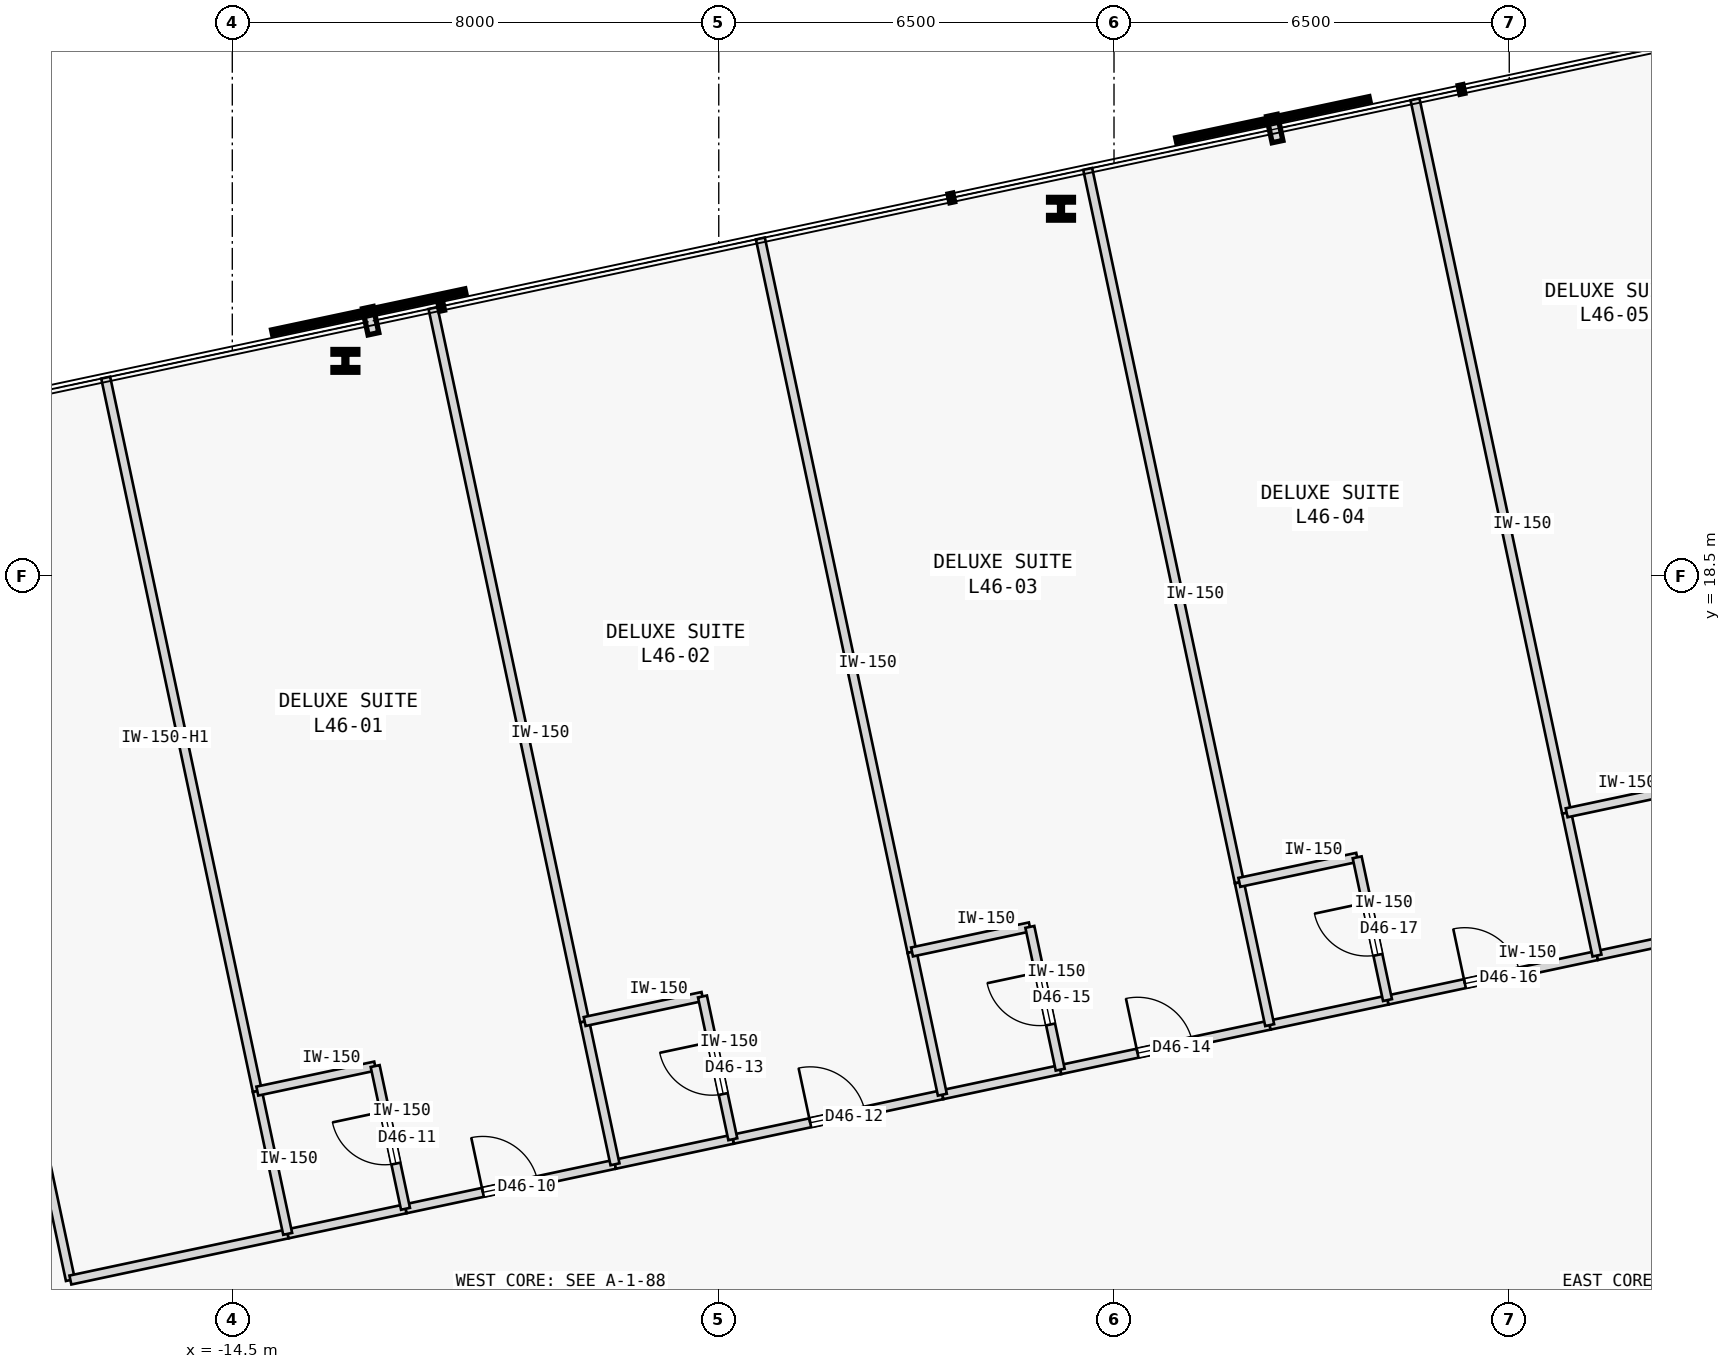
"""IFC4 building model, lengths in metres.
Left out: names, types, materials, properties, quantities, classifications, styles, units other than length and angle.
Written with IfcOpenShell. Run it as: python <this file> out.ifc"""

import sys

from ifc_helpers import new_model, si_unit, direction, frame, frame_2d, origin, origin_2d, place, context, subcontext, project, spatial, rectangle, i_section, extrude, element, fill, save


model = new_model("IFC4")
c1 = context("Model", 3, precision=1e-05, world=origin(), true_north=direction((0.0, 1.0)))
c2 = subcontext(c1, "Body", "Model", "MODEL_VIEW")
j1 = project(units=[si_unit("LENGTHUNIT", "METRE"), si_unit("PLANEANGLEUNIT", "RADIAN")], contexts=[c1])
p1 = place(None, origin())
s1 = spatial("IfcSite", under=j1, at=p1, CompositionType="ELEMENT")
p2 = place(p1, origin())
s2 = spatial("IfcBuilding", under=s1, at=p2, CompositionType="ELEMENT")
p3 = place(p2, frame((0.0, 0.0, 178.6)))
s3 = spatial("IfcBuildingStorey", under=s2, at=p3, CompositionType="ELEMENT", Elevation=178.6)
for number, where, z_axis, x_axis in (
    (1, (-0.872, 24.543, 0.0), (0.0, 0.0, 1.0), (1.0, 0.0, 0.0)),
    (2, (-12.64, 22.042, 0.0), (0.0, 0.0, 1.0), (1.0, 0.0, 0.0)),
):
    element("IfcColumn", number, at=place(p3, frame(where, z_axis=z_axis, x_axis=x_axis)), inside=s3, PredefinedType="COLUMN", context=c2, shape_type="SweptSolid", body=[
        extrude(i_section(OverallWidth=0.409, OverallDepth=0.374, WebThickness=0.048, FlangeThickness=0.077, FilletRadius=0.015, at=origin_2d()), origin(), (0.0, 0.0, 1.0), 3.4),
    ])
p4 = place(p3, frame((-17.162, 6.926, 0.0), z_axis=(0.0, 0.0, 1.0), x_axis=(-0.207911421929, 0.978147657888, 0.0)))
e3 = element("IfcWall", 3, at=p4, inside=s3, PredefinedType="PARTITIONING", context=c2, shape_type="SweptSolid", body=[
    extrude(rectangle(XDim=13.195, YDim=0.15, at=frame_2d((6.598, 0.0))), origin(), (0.0, 0.0, 1.0), 2.725),
])
p5 = place(p4, frame((6.137, 0.0, 0.0)))
e4 = element("IfcOpeningElement", 4, at=p5, cuts=e3, PredefinedType="OPENING", context=c2, shape_type="SweptSolid", body=[
    extrude(rectangle(XDim=0.92, YDim=2.15, at=frame_2d((0.46, 1.075))), frame((0.0, 0.085, 0.0), z_axis=(0.0, -1.0, 0.0), x_axis=(1.0, 0.0, 0.0)), (0.0, 0.0, 1.0), 0.17),
])
p6 = place(p3, frame((-17.162, 6.926, 0.0), z_axis=(0.0, 0.0, 1.0), x_axis=(0.978147299501, 0.207913108004, 0.0)))
e5 = element("IfcWall", 5, at=p6, inside=s3, PredefinedType="PARTITIONING", context=c2, shape_type="SweptSolid", body=[
    extrude(rectangle(XDim=3.653, YDim=0.15, at=frame_2d((1.827, 0.0))), origin(), (0.0, 0.0, 1.0), 3.175),
])
p7 = place(p3, frame((-11.652, 8.097, 0.0), z_axis=(0.0, 0.0, 1.0), x_axis=(0.978153036861, 0.207886114205, 0.0)))
e6 = element("IfcWall", 6, at=p7, inside=s3, PredefinedType="PARTITIONING", context=c2, shape_type="SweptSolid", body=[
    extrude(rectangle(XDim=3.522, YDim=0.15, at=frame_2d((1.761, 0.0))), origin(), (0.0, 0.0, 1.0), 3.175),
])
p8 = place(p7, frame((1.301, 0.0, 0.0)))
e7 = element("IfcOpeningElement", 7, at=p8, cuts=e6, PredefinedType="OPENING", context=c2, shape_type="SweptSolid", body=[
    extrude(rectangle(XDim=0.92, YDim=2.15, at=frame_2d((0.46, 1.075))), frame((0.0, 0.085, 0.0), z_axis=(0.0, -1.0, 0.0), x_axis=(1.0, 0.0, 0.0)), (0.0, 0.0, 1.0), 0.17),
])
p9 = place(p3, frame((-13.589, 7.685, 0.0), z_axis=(0.0, 0.0, 1.0), x_axis=(0.97811873796, 0.208047433175, 0.0)))
e8 = element("IfcWall", 8, at=p9, inside=s3, PredefinedType="PARTITIONING", context=c2, shape_type="SweptSolid", body=[
    extrude(rectangle(XDim=1.981, YDim=0.15, at=frame_2d((0.99, 0.0))), origin(), (0.0, 0.0, 1.0), 3.175),
])
p10 = place(p3, frame((-6.269, 9.241, 0.0), z_axis=(0.0, 0.0, 1.0), x_axis=(0.978150924733, 0.207896052016, 0.0)))
e9 = element("IfcWall", 9, at=p10, inside=s3, PredefinedType="PARTITIONING", context=c2, shape_type="SweptSolid", body=[
    extrude(rectangle(XDim=3.523, YDim=0.15, at=frame_2d((1.761, 0.0))), origin(), (0.0, 0.0, 1.0), 3.175),
])
p11 = place(p10, frame((1.302, 0.0, 0.0)))
e10 = element("IfcOpeningElement", 10, at=p11, cuts=e9, PredefinedType="OPENING", context=c2, shape_type="SweptSolid", body=[
    extrude(rectangle(XDim=0.92, YDim=2.15, at=frame_2d((0.46, 1.075))), frame((0.0, 0.085, 0.0), z_axis=(0.0, -1.0, 0.0), x_axis=(1.0, 0.0, 0.0)), (0.0, 0.0, 1.0), 0.17),
])
p12 = place(p3, frame((-8.207, 8.83, 0.0), z_axis=(0.0, 0.0, 1.0), x_axis=(0.978149140323, 0.20790444749, 0.0)))
e11 = element("IfcWall", 11, at=p12, inside=s3, PredefinedType="PARTITIONING", context=c2, shape_type="SweptSolid", body=[
    extrude(rectangle(XDim=1.981, YDim=0.15, at=frame_2d((0.99, 0.0))), origin(), (0.0, 0.0, 1.0), 3.175),
])
p13 = place(p3, frame((-0.885, 10.386, 0.0), z_axis=(0.0, 0.0, 1.0), x_axis=(0.978153036861, 0.207886114205, 0.0)))
e12 = element("IfcWall", 12, at=p13, inside=s3, PredefinedType="PARTITIONING", context=c2, shape_type="SweptSolid", body=[
    extrude(rectangle(XDim=3.522, YDim=0.15, at=frame_2d((1.761, 0.0))), origin(), (0.0, 0.0, 1.0), 3.175),
])
p14 = place(p13, frame((1.301, 0.0, 0.0)))
e13 = element("IfcOpeningElement", 13, at=p14, cuts=e12, PredefinedType="OPENING", context=c2, shape_type="SweptSolid", body=[
    extrude(rectangle(XDim=0.92, YDim=2.15, at=frame_2d((0.46, 1.075))), frame((0.0, 0.085, 0.0), z_axis=(0.0, -1.0, 0.0), x_axis=(1.0, 0.0, 0.0)), (0.0, 0.0, 1.0), 0.17),
])
p15 = place(p3, frame((-2.823, 9.974, 0.0), z_axis=(0.0, 0.0, 1.0), x_axis=(0.978149140323, 0.20790444749, 0.0)))
e14 = element("IfcWall", 14, at=p15, inside=s3, PredefinedType="PARTITIONING", context=c2, shape_type="SweptSolid", body=[
    extrude(rectangle(XDim=1.981, YDim=0.15, at=frame_2d((0.99, 0.0))), origin(), (0.0, 0.0, 1.0), 3.175),
])
p16 = place(p3, frame((4.498, 11.53, 0.0), z_axis=(0.0, 0.0, 1.0), x_axis=(0.978135941404, 0.207966536089, 0.0)))
e15 = element("IfcWall", 15, at=p16, inside=s3, PredefinedType="PARTITIONING", context=c2, shape_type="SweptSolid", body=[
    extrude(rectangle(XDim=3.522, YDim=0.15, at=frame_2d((1.761, 0.0))), origin(), (0.0, 0.0, 1.0), 3.175),
])
p17 = place(p16, frame((1.301, 0.0, 0.0)))
e16 = element("IfcOpeningElement", 16, at=p17, cuts=e15, PredefinedType="OPENING", context=c2, shape_type="SweptSolid", body=[
    extrude(rectangle(XDim=0.92, YDim=2.15, at=frame_2d((0.46, 1.075))), frame((0.0, 0.085, 0.0), z_axis=(0.0, -1.0, 0.0), x_axis=(1.0, 0.0, 0.0)), (0.0, 0.0, 1.0), 0.17),
])
p18 = place(p3, frame((2.56, 11.118, 0.0), z_axis=(0.0, 0.0, 1.0), x_axis=(0.978149140323, 0.20790444749, 0.0)))
e17 = element("IfcWall", 17, at=p18, inside=s3, PredefinedType="PARTITIONING", context=c2, shape_type="SweptSolid", body=[
    extrude(rectangle(XDim=1.981, YDim=0.15, at=frame_2d((0.99, 0.0))), origin(), (0.0, 0.0, 1.0), 3.175),
])
p19 = place(p3, frame((7.943, 12.262, 0.0), z_axis=(0.0, 0.0, 1.0), x_axis=(0.978146728319, 0.207915795165, 0.0)))
e18 = element("IfcWall", 18, at=p19, inside=s3, PredefinedType="PARTITIONING", context=c2, shape_type="SweptSolid", body=[
    extrude(rectangle(XDim=2.15, YDim=0.15, at=frame_2d((1.075, 0.0))), origin(), (0.0, 0.0, 1.0), 3.175),
])
p20 = place(p3, frame((-14.088, 10.033, 0.0), z_axis=(0.0, 0.0, 1.0), x_axis=(-0.207910848762, 0.978147779718, 0.0)))
e19 = element("IfcWall", 19, at=p20, inside=s3, PredefinedType="PARTITIONING", context=c2, shape_type="SweptSolid", body=[
    extrude(rectangle(XDim=11.995, YDim=0.15, at=frame_2d((5.998, 0.0))), origin(), (0.0, 0.0, 1.0), 2.725),
])
p21 = place(p3, frame((-13.589, 7.685, 0.0), z_axis=(0.0, 0.0, 1.0), x_axis=(-0.207917150959, 0.978146440129, 0.0)))
e20 = element("IfcWall", 20, at=p21, inside=s3, PredefinedType="PARTITIONING", context=c2, shape_type="SweptSolid", body=[
    extrude(rectangle(XDim=2.4, YDim=0.15, at=frame_2d((1.2, 0.0))), origin(), (0.0, 0.0, 1.0), 3.175),
])
p22 = place(p3, frame((-14.088, 10.033, 0.0), z_axis=(0.0, 0.0, 1.0), x_axis=(0.978149140323, 0.20790444749, 0.0)))
e21 = element("IfcWall", 21, at=p22, inside=s3, PredefinedType="PARTITIONING", context=c2, shape_type="SweptSolid", body=[
    extrude(rectangle(XDim=1.981, YDim=0.15, at=frame_2d((0.99, 0.0))), origin(), (0.0, 0.0, 1.0), 3.175),
])
p23 = place(p3, frame((-11.652, 8.097, 0.0), z_axis=(0.0, 0.0, 1.0), x_axis=(-0.207840504985, 0.978162729042, 0.0)))
e22 = element("IfcWall", 22, at=p23, inside=s3, PredefinedType="PARTITIONING", context=c2, shape_type="SweptSolid", body=[
    extrude(rectangle(XDim=2.4, YDim=0.15, at=frame_2d((1.2, 0.0))), origin(), (0.0, 0.0, 1.0), 3.175),
])
p24 = place(p23, frame((0.76, 0.0, 0.0)))
e23 = element("IfcOpeningElement", 23, at=p24, cuts=e22, PredefinedType="OPENING", context=c2, shape_type="SweptSolid", body=[
    extrude(rectangle(XDim=0.88, YDim=2.15, at=frame_2d((0.44, 1.075))), frame((0.0, 0.085, 0.0), z_axis=(0.0, -1.0, 0.0), x_axis=(1.0, 0.0, 0.0)), (0.0, 0.0, 1.0), 0.17),
])
p25 = place(p3, frame((-8.706, 11.177, 0.0), z_axis=(0.0, 0.0, 1.0), x_axis=(-0.207910848762, 0.978147779718, 0.0)))
e24 = element("IfcWall", 24, at=p25, inside=s3, PredefinedType="PARTITIONING", context=c2, shape_type="SweptSolid", body=[
    extrude(rectangle(XDim=11.995, YDim=0.15, at=frame_2d((5.998, 0.0))), origin(), (0.0, 0.0, 1.0), 3.175),
])
p26 = place(p3, frame((-8.207, 8.83, 0.0), z_axis=(0.0, 0.0, 1.0), x_axis=(-0.207937840262, 0.978142042133, 0.0)))
e25 = element("IfcWall", 25, at=p26, inside=s3, PredefinedType="PARTITIONING", context=c2, shape_type="SweptSolid", body=[
    extrude(rectangle(XDim=2.4, YDim=0.15, at=frame_2d((1.2, 0.0))), origin(), (0.0, 0.0, 1.0), 3.175),
])
p27 = place(p3, frame((-8.706, 11.177, 0.0), z_axis=(0.0, 0.0, 1.0), x_axis=(0.978149140323, 0.20790444749, 0.0)))
e26 = element("IfcWall", 26, at=p27, inside=s3, PredefinedType="PARTITIONING", context=c2, shape_type="SweptSolid", body=[
    extrude(rectangle(XDim=1.981, YDim=0.15, at=frame_2d((0.99, 0.0))), origin(), (0.0, 0.0, 1.0), 3.175),
])
p28 = place(p3, frame((-6.269, 9.241, 0.0), z_axis=(0.0, 0.0, 1.0), x_axis=(-0.207937840262, 0.978142042133, 0.0)))
e27 = element("IfcWall", 27, at=p28, inside=s3, PredefinedType="PARTITIONING", context=c2, shape_type="SweptSolid", body=[
    extrude(rectangle(XDim=2.4, YDim=0.15, at=frame_2d((1.2, 0.0))), origin(), (0.0, 0.0, 1.0), 3.175),
])
p29 = place(p28, frame((0.76, 0.0, 0.0)))
e28 = element("IfcOpeningElement", 28, at=p29, cuts=e27, PredefinedType="OPENING", context=c2, shape_type="SweptSolid", body=[
    extrude(rectangle(XDim=0.88, YDim=2.15, at=frame_2d((0.44, 1.075))), frame((0.0, 0.085, 0.0), z_axis=(0.0, -1.0, 0.0), x_axis=(1.0, 0.0, 0.0)), (0.0, 0.0, 1.0), 0.17),
])
p30 = place(p3, frame((-3.322, 12.321, 0.0), z_axis=(0.0, 0.0, 1.0), x_axis=(-0.207910848762, 0.978147779718, 0.0)))
e29 = element("IfcWall", 29, at=p30, inside=s3, PredefinedType="PARTITIONING", context=c2, shape_type="SweptSolid", body=[
    extrude(rectangle(XDim=11.995, YDim=0.15, at=frame_2d((5.998, 0.0))), origin(), (0.0, 0.0, 1.0), 3.175),
])
p31 = place(p3, frame((-2.823, 9.974, 0.0), z_axis=(0.0, 0.0, 1.0), x_axis=(-0.207937840262, 0.978142042133, 0.0)))
e30 = element("IfcWall", 30, at=p31, inside=s3, PredefinedType="PARTITIONING", context=c2, shape_type="SweptSolid", body=[
    extrude(rectangle(XDim=2.4, YDim=0.15, at=frame_2d((1.2, 0.0))), origin(), (0.0, 0.0, 1.0), 3.175),
])
p32 = place(p3, frame((-3.322, 12.321, 0.0), z_axis=(0.0, 0.0, 1.0), x_axis=(0.978124071753, 0.208022355187, 0.0)))
e31 = element("IfcWall", 31, at=p32, inside=s3, PredefinedType="PARTITIONING", context=c2, shape_type="SweptSolid", body=[
    extrude(rectangle(XDim=1.981, YDim=0.15, at=frame_2d((0.991, 0.0))), origin(), (0.0, 0.0, 1.0), 3.175),
])
p33 = place(p3, frame((-0.885, 10.386, 0.0), z_axis=(0.0, 0.0, 1.0), x_axis=(-0.207917150959, 0.978146440129, 0.0)))
e32 = element("IfcWall", 32, at=p33, inside=s3, PredefinedType="PARTITIONING", context=c2, shape_type="SweptSolid", body=[
    extrude(rectangle(XDim=2.4, YDim=0.15, at=frame_2d((1.2, 0.0))), origin(), (0.0, 0.0, 1.0), 3.175),
])
p34 = place(p33, frame((0.76, 0.0, 0.0)))
e33 = element("IfcOpeningElement", 33, at=p34, cuts=e32, PredefinedType="OPENING", context=c2, shape_type="SweptSolid", body=[
    extrude(rectangle(XDim=0.88, YDim=2.15, at=frame_2d((0.44, 1.075))), frame((0.0, 0.085, 0.0), z_axis=(0.0, -1.0, 0.0), x_axis=(1.0, 0.0, 0.0)), (0.0, 0.0, 1.0), 0.17),
])
p35 = place(p3, frame((2.061, 13.466, 0.0), z_axis=(0.0, 0.0, 1.0), x_axis=(-0.207910848762, 0.978147779718, 0.0)))
e34 = element("IfcWall", 34, at=p35, inside=s3, PredefinedType="PARTITIONING", context=c2, shape_type="SweptSolid", body=[
    extrude(rectangle(XDim=11.995, YDim=0.15, at=frame_2d((5.998, 0.0))), origin(), (0.0, 0.0, 1.0), 3.175),
])
p36 = place(p3, frame((2.56, 11.118, 0.0), z_axis=(0.0, 0.0, 1.0), x_axis=(-0.207917150959, 0.978146440129, 0.0)))
e35 = element("IfcWall", 35, at=p36, inside=s3, PredefinedType="PARTITIONING", context=c2, shape_type="SweptSolid", body=[
    extrude(rectangle(XDim=2.4, YDim=0.15, at=frame_2d((1.2, 0.0))), origin(), (0.0, 0.0, 1.0), 3.175),
])
p37 = place(p3, frame((2.061, 13.466, 0.0), z_axis=(0.0, 0.0, 1.0), x_axis=(0.978149140323, 0.20790444749, 0.0)))
e36 = element("IfcWall", 36, at=p37, inside=s3, PredefinedType="PARTITIONING", context=c2, shape_type="SweptSolid", body=[
    extrude(rectangle(XDim=1.981, YDim=0.15, at=frame_2d((0.99, 0.0))), origin(), (0.0, 0.0, 1.0), 3.175),
])
p38 = place(p3, frame((4.498, 11.53, 0.0), z_axis=(0.0, 0.0, 1.0), x_axis=(-0.207917150959, 0.978146440129, 0.0)))
e37 = element("IfcWall", 37, at=p38, inside=s3, PredefinedType="PARTITIONING", context=c2, shape_type="SweptSolid", body=[
    extrude(rectangle(XDim=2.4, YDim=0.15, at=frame_2d((1.2, 0.0))), origin(), (0.0, 0.0, 1.0), 3.175),
])
p39 = place(p38, frame((0.76, 0.0, 0.0)))
e38 = element("IfcOpeningElement", 38, at=p39, cuts=e37, PredefinedType="OPENING", context=c2, shape_type="SweptSolid", body=[
    extrude(rectangle(XDim=0.88, YDim=2.15, at=frame_2d((0.44, 1.075))), frame((0.0, 0.085, 0.0), z_axis=(0.0, -1.0, 0.0), x_axis=(1.0, 0.0, 0.0)), (0.0, 0.0, 1.0), 0.17),
])
p40 = place(p3, frame((7.444, 14.61, 0.0), z_axis=(0.0, 0.0, 1.0), x_axis=(-0.207910848762, 0.978147779718, 0.0)))
e39 = element("IfcWall", 39, at=p40, inside=s3, PredefinedType="PARTITIONING", context=c2, shape_type="SweptSolid", body=[
    extrude(rectangle(XDim=11.995, YDim=0.15, at=frame_2d((5.998, 0.0))), origin(), (0.0, 0.0, 1.0), 3.175),
])
p41 = place(p3, frame((7.943, 12.262, 0.0), z_axis=(0.0, 0.0, 1.0), x_axis=(-0.207937840262, 0.978142042133, 0.0)))
e40 = element("IfcWall", 40, at=p41, inside=s3, PredefinedType="PARTITIONING", context=c2, shape_type="SweptSolid", body=[
    extrude(rectangle(XDim=2.4, YDim=0.15, at=frame_2d((1.2, 0.0))), origin(), (0.0, 0.0, 1.0), 3.175),
])
p42 = place(p3, frame((7.444, 14.61, 0.0), z_axis=(0.0, 0.0, 1.0), x_axis=(0.978151636287, 0.207892704126, 0.0)))
e41 = element("IfcWall", 41, at=p42, inside=s3, PredefinedType="PARTITIONING", context=c2, shape_type="SweptSolid", body=[
    extrude(rectangle(XDim=2.15, YDim=0.15, at=frame_2d((1.075, 0.0))), origin(), (0.0, 0.0, 1.0), 3.175),
])
p43 = place(p8, origin())
e42 = element("IfcDoor", 42, at=p43, inside=s3, OperationType="SINGLE_SWING_LEFT", PredefinedType="DOOR", context=c2, shape_type="SweptSolid", body=[
    extrude(rectangle(XDim=0.92, YDim=2.15, at=frame_2d((0.46, 1.075))), frame((0.0, 0.025, 0.0), z_axis=(0.0, -1.0, 0.0), x_axis=(1.0, 0.0, 0.0)), (0.0, 0.0, 1.0), 0.05),
])
fill(e7, e42)
p44 = place(p24, origin())
e43 = element("IfcDoor", 43, at=p44, inside=s3, OperationType="SINGLE_SWING_RIGHT", PredefinedType="DOOR", context=c2, shape_type="SweptSolid", body=[
    extrude(rectangle(XDim=0.88, YDim=2.15, at=frame_2d((0.44, 1.075))), frame((0.0, 0.025, 0.0), z_axis=(0.0, -1.0, 0.0), x_axis=(1.0, 0.0, 0.0)), (0.0, 0.0, 1.0), 0.05),
])
fill(e23, e43)
p45 = place(p11, origin())
e44 = element("IfcDoor", 44, at=p45, inside=s3, OperationType="SINGLE_SWING_LEFT", PredefinedType="DOOR", context=c2, shape_type="SweptSolid", body=[
    extrude(rectangle(XDim=0.92, YDim=2.15, at=frame_2d((0.46, 1.075))), frame((0.0, 0.025, 0.0), z_axis=(0.0, -1.0, 0.0), x_axis=(1.0, 0.0, 0.0)), (0.0, 0.0, 1.0), 0.05),
])
fill(e10, e44)
p46 = place(p29, origin())
e45 = element("IfcDoor", 45, at=p46, inside=s3, OperationType="SINGLE_SWING_RIGHT", PredefinedType="DOOR", context=c2, shape_type="SweptSolid", body=[
    extrude(rectangle(XDim=0.88, YDim=2.15, at=frame_2d((0.44, 1.075))), frame((0.0, 0.025, 0.0), z_axis=(0.0, -1.0, 0.0), x_axis=(1.0, 0.0, 0.0)), (0.0, 0.0, 1.0), 0.05),
])
fill(e28, e45)
p47 = place(p14, origin())
e46 = element("IfcDoor", 46, at=p47, inside=s3, OperationType="SINGLE_SWING_LEFT", PredefinedType="DOOR", context=c2, shape_type="SweptSolid", body=[
    extrude(rectangle(XDim=0.92, YDim=2.15, at=frame_2d((0.46, 1.075))), frame((0.0, 0.025, 0.0), z_axis=(0.0, -1.0, 0.0), x_axis=(1.0, 0.0, 0.0)), (0.0, 0.0, 1.0), 0.05),
])
fill(e13, e46)
p48 = place(p34, origin())
e47 = element("IfcDoor", 47, at=p48, inside=s3, OperationType="SINGLE_SWING_RIGHT", PredefinedType="DOOR", context=c2, shape_type="SweptSolid", body=[
    extrude(rectangle(XDim=0.88, YDim=2.15, at=frame_2d((0.44, 1.075))), frame((0.0, 0.025, 0.0), z_axis=(0.0, -1.0, 0.0), x_axis=(1.0, 0.0, 0.0)), (0.0, 0.0, 1.0), 0.05),
])
fill(e33, e47)
p49 = place(p17, origin())
e48 = element("IfcDoor", 48, at=p49, inside=s3, OperationType="SINGLE_SWING_LEFT", PredefinedType="DOOR", context=c2, shape_type="SweptSolid", body=[
    extrude(rectangle(XDim=0.92, YDim=2.15, at=frame_2d((0.46, 1.075))), frame((0.0, 0.025, 0.0), z_axis=(0.0, -1.0, 0.0), x_axis=(1.0, 0.0, 0.0)), (0.0, 0.0, 1.0), 0.05),
])
fill(e16, e48)
p50 = place(p39, origin())
e49 = element("IfcDoor", 49, at=p50, inside=s3, OperationType="SINGLE_SWING_RIGHT", PredefinedType="DOOR", context=c2, shape_type="SweptSolid", body=[
    extrude(rectangle(XDim=0.88, YDim=2.15, at=frame_2d((0.44, 1.075))), frame((0.0, 0.025, 0.0), z_axis=(0.0, -1.0, 0.0), x_axis=(1.0, 0.0, 0.0)), (0.0, 0.0, 1.0), 0.05),
])
fill(e38, e49)
save(model, sys.argv[1])
